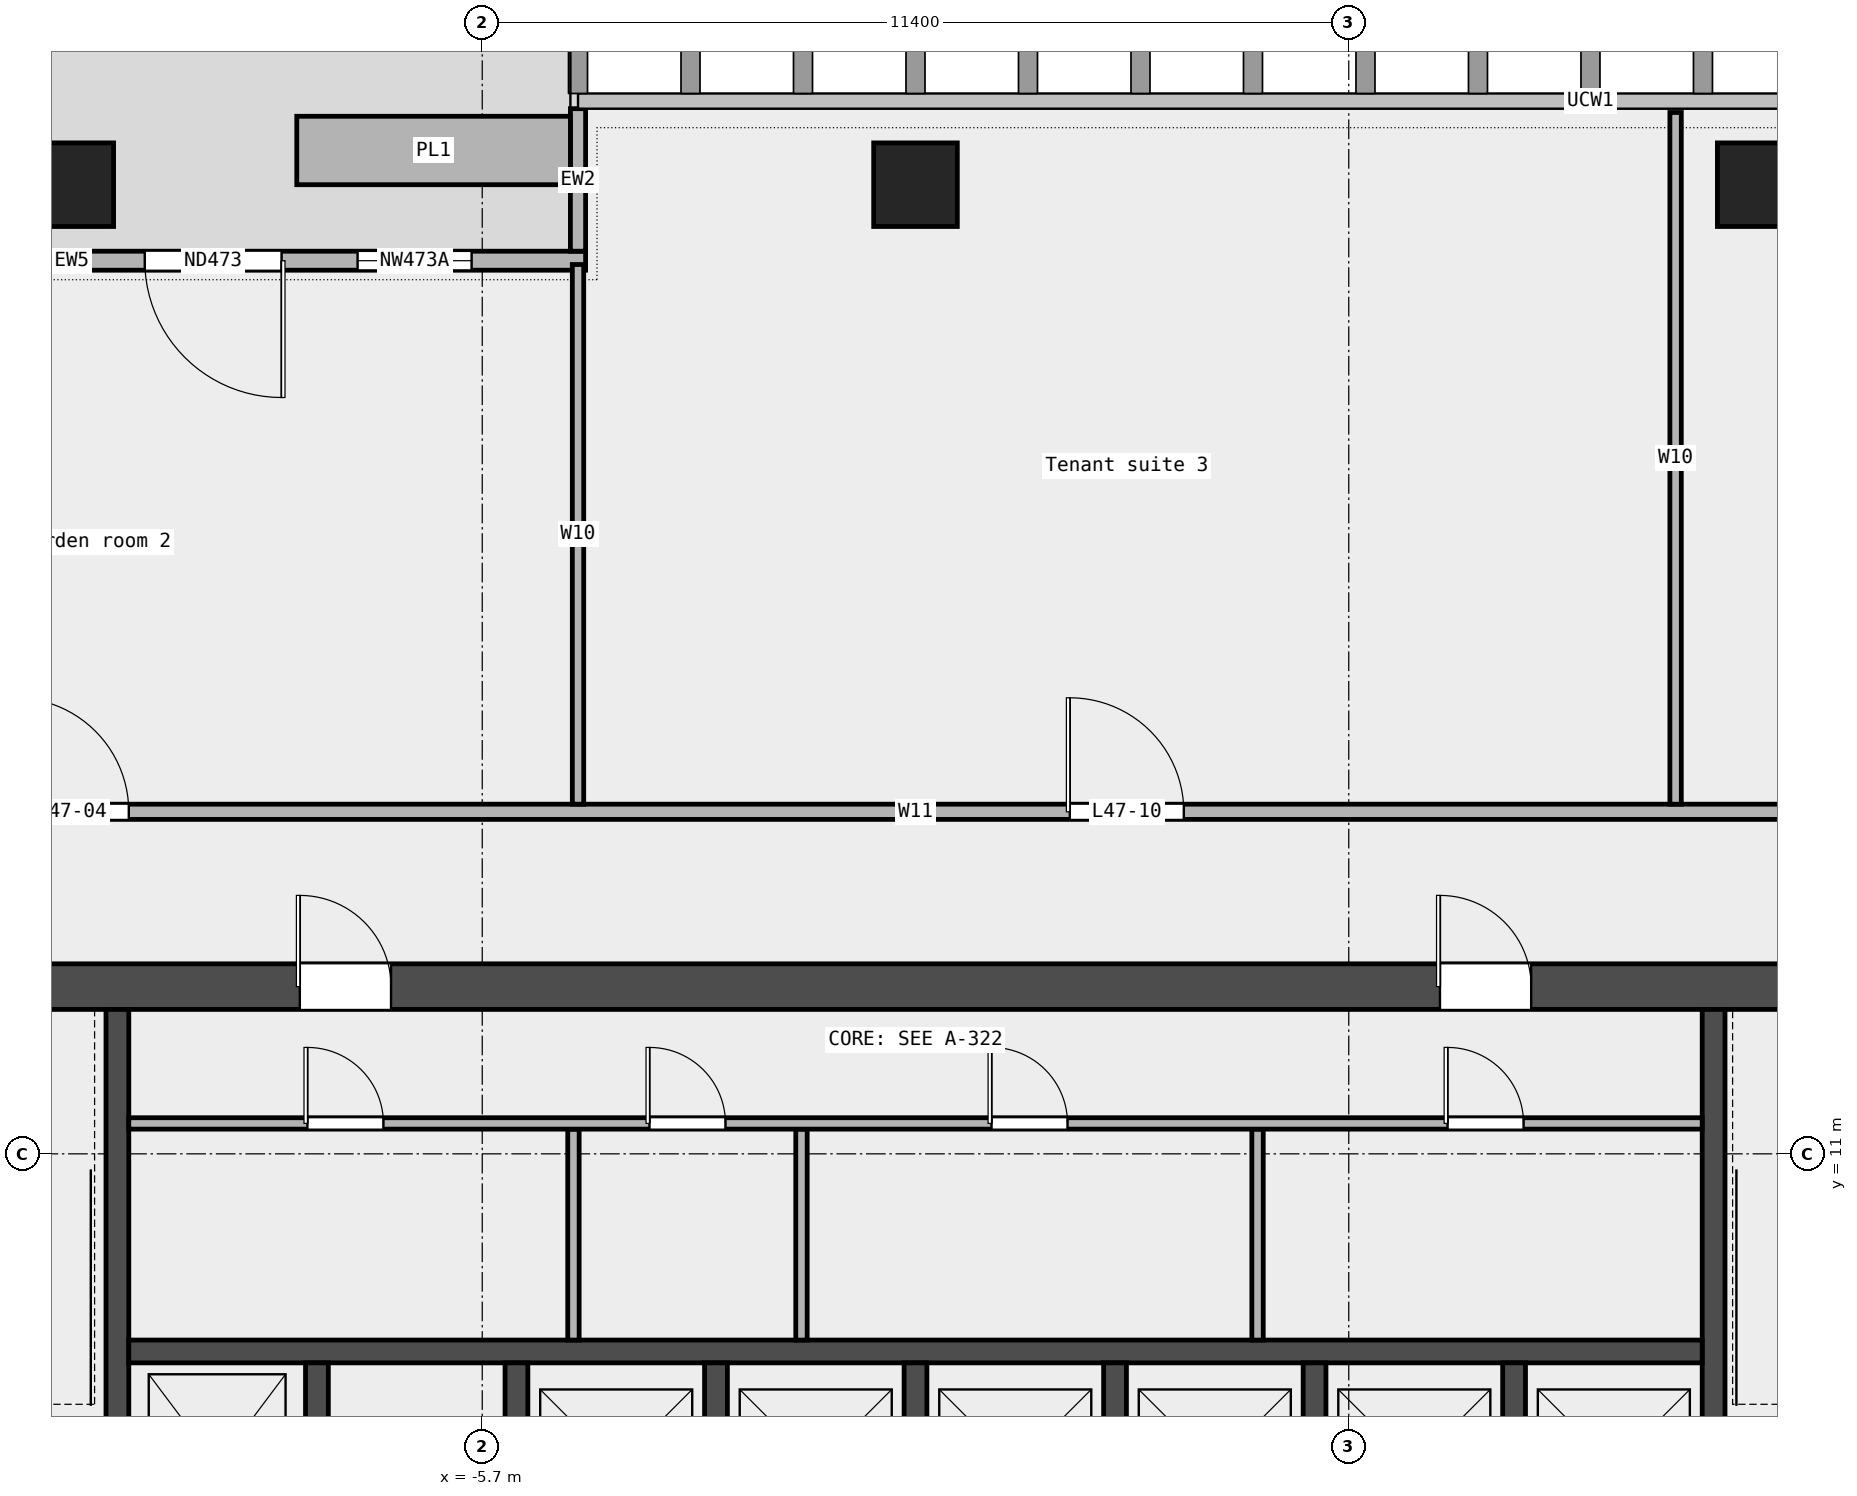
"""IFC4 building model, lengths in metres.
Left out: names, types, materials, properties, quantities, classifications, styles, units other than length and angle.
Written with IfcOpenShell. Run it as: python <this file> out.ifc"""

import sys

from ifc_helpers import new_model, si_unit, direction, frame, frame_2d, origin, origin_2d, place, context, subcontext, project, spatial, rectangle, extrude, element, fill, save


model = new_model("IFC4")
c1 = context("Model", 3, precision=1e-05, world=origin(), true_north=direction((0.0, 1.0)))
c2 = subcontext(c1, "Body", "Model", "MODEL_VIEW")
j1 = project(units=[si_unit("LENGTHUNIT", "METRE"), si_unit("PLANEANGLEUNIT", "RADIAN")], contexts=[c1])
p1 = place(None, origin())
s1 = spatial("IfcSite", under=j1, at=p1, CompositionType="ELEMENT")
p2 = place(p1, origin())
s2 = spatial("IfcBuilding", under=s1, at=p2, CompositionType="ELEMENT")
p3 = place(p2, frame((0.0, 0.0, 223.0)))
s3 = spatial("IfcBuildingStorey", under=s2, at=p3, CompositionType="ELEMENT", Elevation=223.0)
for number, where, z_axis, x_axis in (
    (1, (11.1, 23.75, 0.0), (0.0, 0.0, 1.0), (1.0, 0.0, 0.0)),
    (2, (0.0, 23.75, 0.0), (0.0, 0.0, 1.0), (1.0, 0.0, 0.0)),
    (3, (-11.1, 23.75, 0.0), (0.0, 0.0, 1.0), (1.0, 0.0, 0.0)),
):
    element("IfcColumn", number, at=place(p3, frame(where, z_axis=z_axis, x_axis=x_axis)), inside=s3, PredefinedType="COLUMN", context=c2, shape_type="SweptSolid", body=[
        extrude(rectangle(XDim=1.1, YDim=1.1, at=origin_2d()), origin(), (0.0, 0.0, 1.0), 3.6),
    ])
p4 = place(p3, frame((-4.34, 22.75, 0.0), z_axis=(0.0, 0.0, 1.0), x_axis=(-1.0, 0.0, 0.0)))
e4 = element("IfcWall", 4, at=p4, inside=s3, PredefinedType="STANDARD", context=c2, shape_type="SweptSolid", body=[
    extrude(rectangle(XDim=13.52, YDim=0.25, at=frame_2d((6.76, 0.0))), origin(), (0.0, 0.0, 1.0), 3.6),
])
p5 = place(p4, frame((1.5, 0.0, 0.45)))
e5 = element("IfcOpeningElement", 5, at=p5, cuts=e4, PredefinedType="OPENING", context=c2, shape_type="SweptSolid", body=[
    extrude(rectangle(XDim=1.5, YDim=2.4, at=frame_2d((0.75, 1.2))), frame((0.0, 0.137, 0.0), z_axis=(0.0, -1.0, 0.0), x_axis=(1.0, 0.0, 0.0)), (0.0, 0.0, 1.0), 0.274),
])
p6 = place(p4, frame((4.0, 0.0, 0.0)))
e6 = element("IfcOpeningElement", 6, at=p6, cuts=e4, PredefinedType="OPENING", context=c2, shape_type="SweptSolid", body=[
    extrude(rectangle(XDim=1.8, YDim=2.4, at=frame_2d((0.9, 1.2))), frame((0.0, 0.137, 0.0), z_axis=(0.0, -1.0, 0.0), x_axis=(1.0, 0.0, 0.0)), (0.0, 0.0, 1.0), 0.274),
])
p7 = place(p4, frame((10.5, 0.0, 0.45)))
e7 = element("IfcOpeningElement", 7, at=p7, cuts=e4, PredefinedType="OPENING", context=c2, shape_type="SweptSolid", body=[
    extrude(rectangle(XDim=1.5, YDim=2.4, at=frame_2d((0.75, 1.2))), frame((0.0, 0.137, 0.0), z_axis=(0.0, -1.0, 0.0), x_axis=(1.0, 0.0, 0.0)), (0.0, 0.0, 1.0), 0.274),
])
p8 = place(p3, frame((-4.44, 24.75, 0.0), z_axis=(0.0, 0.0, 1.0), x_axis=(0.0, -1.0, 0.0)))
e8 = element("IfcWall", 8, at=p8, inside=s3, PredefinedType="STANDARD", context=c2, shape_type="SweptSolid", body=[
    extrude(rectangle(XDim=1.875, YDim=0.2, at=frame_2d((0.938, 0.0))), origin(), (0.0, 0.0, 1.0), 3.6),
])
p9 = place(p3, frame((-4.54, 24.2, 0.0), z_axis=(0.0, 0.0, 1.0), x_axis=(-1.0, 0.0, 0.0)))
e9 = element("IfcWall", 9, at=p9, inside=s3, PredefinedType="STANDARD", context=c2, shape_type="SweptSolid", body=[
    extrude(rectangle(XDim=3.6, YDim=0.9, at=frame_2d((1.8, 0.0))), origin(), (0.0, 0.0, 1.0), 0.7),
])
p10 = place(p3, frame((-28.15, 15.5, 0.0), z_axis=(0.0, 0.0, 1.0), x_axis=(1.0, 0.0, 0.0)))
e10 = element("IfcWall", 10, at=p10, inside=s3, PredefinedType="PARTITIONING", context=c2, shape_type="SweptSolid", body=[
    extrude(rectangle(XDim=56.3, YDim=0.2, at=frame_2d((28.15, 0.0))), origin(), (0.0, 0.0, 1.0), 3.6),
])
p11 = place(p10, frame((16.3, 0.0, 0.0)))
e11 = element("IfcOpeningElement", 11, at=p11, cuts=e10, PredefinedType="OPENING", context=c2, shape_type="SweptSolid", body=[
    extrude(rectangle(XDim=1.5, YDim=2.1, at=frame_2d((0.75, 1.05))), frame((0.0, 0.112, 0.0), z_axis=(0.0, -1.0, 0.0), x_axis=(1.0, 0.0, 0.0)), (0.0, 0.0, 1.0), 0.224),
])
p12 = place(p10, frame((46.225, 0.0, 0.0)))
e12 = element("IfcOpeningElement", 12, at=p12, cuts=e10, PredefinedType="OPENING", context=c2, shape_type="SweptSolid", body=[
    extrude(rectangle(XDim=1.8, YDim=2.1, at=frame_2d((0.9, 1.05))), frame((0.0, 0.112, 0.0), z_axis=(0.0, -1.0, 0.0), x_axis=(1.0, 0.0, 0.0)), (0.0, 0.0, 1.0), 0.224),
])
p13 = place(p10, frame((30.18, 0.0, 0.0)))
e13 = element("IfcOpeningElement", 13, at=p13, cuts=e10, PredefinedType="OPENING", context=c2, shape_type="SweptSolid", body=[
    extrude(rectangle(XDim=1.5, YDim=2.1, at=frame_2d((0.75, 1.05))), frame((0.0, 0.112, 0.0), z_axis=(0.0, -1.0, 0.0), x_axis=(1.0, 0.0, 0.0)), (0.0, 0.0, 1.0), 0.224),
])
p14 = place(p10, frame((4.695, 0.0, 0.0)))
e14 = element("IfcOpeningElement", 14, at=p14, cuts=e10, PredefinedType="OPENING", context=c2, shape_type="SweptSolid", body=[
    extrude(rectangle(XDim=1.2, YDim=2.1, at=frame_2d((0.6, 1.05))), frame((0.0, 0.112, 0.0), z_axis=(0.0, -1.0, 0.0), x_axis=(1.0, 0.0, 0.0)), (0.0, 0.0, 1.0), 0.224),
])
p15 = place(p3, frame((-4.44, 15.6, 0.0), z_axis=(0.0, 0.0, 1.0), x_axis=(0.0, 1.0, 0.0)))
e15 = element("IfcWall", 15, at=p15, inside=s3, PredefinedType="PARTITIONING", context=c2, shape_type="SweptSolid", body=[
    extrude(rectangle(XDim=7.1, YDim=0.15, at=frame_2d((3.55, 0.0))), origin(), (0.0, 0.0, 1.0), 3.6),
])
p16 = place(p3, frame((10.0, 15.6, 0.0), z_axis=(0.0, 0.0, 1.0), x_axis=(0.0, 1.0, 0.0)))
e16 = element("IfcWall", 16, at=p16, inside=s3, PredefinedType="PARTITIONING", context=c2, shape_type="SweptSolid", body=[
    extrude(rectangle(XDim=9.1, YDim=0.15, at=frame_2d((4.55, 0.0))), origin(), (0.0, 0.0, 1.0), 3.6),
])
p17 = place(p3, frame((-14.4, 13.2, 0.0), z_axis=(0.0, 0.0, 1.0), x_axis=(1.0, 0.0, 0.0)))
e17 = element("IfcWall", 17, at=p17, inside=s3, PredefinedType="SHEAR", context=c2, shape_type="SweptSolid", body=[
    extrude(rectangle(XDim=28.8, YDim=0.6, at=frame_2d((14.4, 0.0))), origin(), (0.0, 0.0, 1.0), 3.7),
])
p18 = place(p17, frame((6.3, 0.0, 0.0)))
e18 = element("IfcOpeningElement", 18, at=p18, cuts=e17, PredefinedType="OPENING", context=c2, shape_type="SweptSolid", body=[
    extrude(rectangle(XDim=1.2, YDim=2.1, at=frame_2d((0.6, 1.05))), frame((0.0, 0.312, 0.0), z_axis=(0.0, -1.0, 0.0), x_axis=(1.0, 0.0, 0.0)), (0.0, 0.0, 1.0), 0.624),
])
p19 = place(p17, frame((21.3, 0.0, 0.0)))
e19 = element("IfcOpeningElement", 19, at=p19, cuts=e17, PredefinedType="OPENING", context=c2, shape_type="SweptSolid", body=[
    extrude(rectangle(XDim=1.2, YDim=2.1, at=frame_2d((0.6, 1.05))), frame((0.0, 0.312, 0.0), z_axis=(0.0, -1.0, 0.0), x_axis=(1.0, 0.0, 0.0)), (0.0, 0.0, 1.0), 0.624),
])
for number, where, z_axis, x_axis in (
    (20, (-10.5, 5.25, 0.0), (0.0, 0.0, 1.0), (0.0, 1.0, 0.0)),
    (21, (10.5, 5.25, 0.0), (0.0, 0.0, 1.0), (0.0, 1.0, 0.0)),
):
    element("IfcWall", number, at=place(p3, frame(where, z_axis=z_axis, x_axis=x_axis)), inside=s3, PredefinedType="SHEAR", context=c2, shape_type="SweptSolid", body=[
        extrude(rectangle(XDim=7.65, YDim=0.3, at=frame_2d((3.825, 0.0))), origin(), (0.0, 0.0, 1.0), 3.7),
    ])
p20 = place(p3, frame((-10.35, 8.4, 0.0), z_axis=(0.0, 0.0, 1.0), x_axis=(1.0, 0.0, 0.0)))
e22 = element("IfcWall", 22, at=p20, inside=s3, PredefinedType="SOLIDWALL", context=c2, shape_type="SweptSolid", body=[
    extrude(rectangle(XDim=20.7, YDim=0.3, at=frame_2d((10.35, 0.0))), origin(), (0.0, 0.0, 1.0), 3.7),
])
for number, where, z_axis, x_axis in (
    (23, (-7.875, 5.55, 0.0), (0.0, 0.0, 1.0), (0.0, 1.0, 0.0)),
    (24, (-5.25, 5.55, 0.0), (0.0, 0.0, 1.0), (0.0, 1.0, 0.0)),
    (25, (-2.625, 5.55, 0.0), (0.0, 0.0, 1.0), (0.0, 1.0, 0.0)),
    (26, (0.0, 5.55, 0.0), (0.0, 0.0, 1.0), (0.0, 1.0, 0.0)),
    (27, (2.625, 5.55, 0.0), (0.0, 0.0, 1.0), (0.0, 1.0, 0.0)),
    (28, (5.25, 5.55, 0.0), (0.0, 0.0, 1.0), (0.0, 1.0, 0.0)),
    (29, (7.875, 5.55, 0.0), (0.0, 0.0, 1.0), (0.0, 1.0, 0.0)),
):
    element("IfcWall", number, at=place(p3, frame(where, z_axis=z_axis, x_axis=x_axis)), inside=s3, PredefinedType="SOLIDWALL", context=c2, shape_type="SweptSolid", body=[
        extrude(rectangle(XDim=2.7, YDim=0.3, at=frame_2d((1.35, 0.0))), origin(), (0.0, 0.0, 1.0), 3.7),
    ])
for number, where, z_axis, x_axis in (
    (30, (-4.5, 8.55, 0.0), (0.0, 0.0, 1.0), (0.0, 1.0, 0.0)),
    (31, (-1.5, 8.55, 0.0), (0.0, 0.0, 1.0), (0.0, 1.0, 0.0)),
    (32, (4.5, 8.55, 0.0), (0.0, 0.0, 1.0), (0.0, 1.0, 0.0)),
):
    element("IfcWall", number, at=place(p3, frame(where, z_axis=z_axis, x_axis=x_axis)), inside=s3, PredefinedType="PARTITIONING", context=c2, shape_type="SweptSolid", body=[
        extrude(rectangle(XDim=2.775, YDim=0.15, at=frame_2d((1.387, 0.0))), origin(), (0.0, 0.0, 1.0), 3.7),
    ])
p21 = place(p3, frame((-10.35, 11.4, 0.0), z_axis=(0.0, 0.0, 1.0), x_axis=(1.0, 0.0, 0.0)))
e33 = element("IfcWall", 33, at=p21, inside=s3, PredefinedType="PARTITIONING", context=c2, shape_type="SweptSolid", body=[
    extrude(rectangle(XDim=20.7, YDim=0.15, at=frame_2d((10.35, 0.0))), origin(), (0.0, 0.0, 1.0), 3.7),
])
p22 = place(p21, frame((2.35, 0.0, 0.0)))
e34 = element("IfcOpeningElement", 34, at=p22, cuts=e33, PredefinedType="OPENING", context=c2, shape_type="SweptSolid", body=[
    extrude(rectangle(XDim=1.0, YDim=2.1, at=frame_2d((0.5, 1.05))), frame((0.0, 0.087, 0.0), z_axis=(0.0, -1.0, 0.0), x_axis=(1.0, 0.0, 0.0)), (0.0, 0.0, 1.0), 0.174),
])
p23 = place(p21, frame((6.85, 0.0, 0.0)))
e35 = element("IfcOpeningElement", 35, at=p23, cuts=e33, PredefinedType="OPENING", context=c2, shape_type="SweptSolid", body=[
    extrude(rectangle(XDim=1.0, YDim=2.1, at=frame_2d((0.5, 1.05))), frame((0.0, 0.087, 0.0), z_axis=(0.0, -1.0, 0.0), x_axis=(1.0, 0.0, 0.0)), (0.0, 0.0, 1.0), 0.174),
])
p24 = place(p21, frame((11.35, 0.0, 0.0)))
e36 = element("IfcOpeningElement", 36, at=p24, cuts=e33, PredefinedType="OPENING", context=c2, shape_type="SweptSolid", body=[
    extrude(rectangle(XDim=1.0, YDim=2.1, at=frame_2d((0.5, 1.05))), frame((0.0, 0.087, 0.0), z_axis=(0.0, -1.0, 0.0), x_axis=(1.0, 0.0, 0.0)), (0.0, 0.0, 1.0), 0.174),
])
p25 = place(p21, frame((17.35, 0.0, 0.0)))
e37 = element("IfcOpeningElement", 37, at=p25, cuts=e33, PredefinedType="OPENING", context=c2, shape_type="SweptSolid", body=[
    extrude(rectangle(XDim=1.0, YDim=2.1, at=frame_2d((0.5, 1.05))), frame((0.0, 0.087, 0.0), z_axis=(0.0, -1.0, 0.0), x_axis=(1.0, 0.0, 0.0)), (0.0, 0.0, 1.0), 0.174),
])
p26 = place(p5, origin())
e38 = element("IfcWindow", 38, at=p26, inside=s3, PartitioningType="SINGLE_PANEL", PredefinedType="WINDOW", context=c2, shape_type="SweptSolid", body=[
    extrude(rectangle(XDim=1.5, YDim=2.4, at=frame_2d((0.75, 1.2))), frame((0.0, 0.03, 0.0), z_axis=(0.0, -1.0, 0.0), x_axis=(1.0, 0.0, 0.0)), (0.0, 0.0, 1.0), 0.06),
])
fill(e5, e38)
p27 = place(p6, origin())
e39 = element("IfcDoor", 39, at=p27, inside=s3, OperationType="DOUBLE_DOOR_SINGLE_SWING", PredefinedType="DOOR", context=c2, shape_type="SweptSolid", body=[
    extrude(rectangle(XDim=1.8, YDim=2.4, at=frame_2d((0.9, 1.2))), frame((0.0, 0.025, 0.0), z_axis=(0.0, -1.0, 0.0), x_axis=(1.0, 0.0, 0.0)), (0.0, 0.0, 1.0), 0.05),
])
fill(e6, e39)
p28 = place(p11, origin())
e40 = element("IfcDoor", 40, at=p28, inside=s3, OperationType="DOUBLE_DOOR_SINGLE_SWING", PredefinedType="DOOR", context=c2, shape_type="SweptSolid", body=[
    extrude(rectangle(XDim=1.5, YDim=2.1, at=frame_2d((0.75, 1.05))), frame((0.0, 0.025, 0.0), z_axis=(0.0, -1.0, 0.0), x_axis=(1.0, 0.0, 0.0)), (0.0, 0.0, 1.0), 0.05),
])
fill(e11, e40)
p29 = place(p13, origin())
e41 = element("IfcDoor", 41, at=p29, inside=s3, OperationType="DOUBLE_DOOR_SINGLE_SWING", PredefinedType="DOOR", context=c2, shape_type="SweptSolid", body=[
    extrude(rectangle(XDim=1.5, YDim=2.1, at=frame_2d((0.75, 1.05))), frame((0.0, 0.025, 0.0), z_axis=(0.0, -1.0, 0.0), x_axis=(1.0, 0.0, 0.0)), (0.0, 0.0, 1.0), 0.05),
])
fill(e13, e41)
p30 = place(p22, origin())
e42 = element("IfcDoor", 42, at=p30, inside=s3, OperationType="SINGLE_SWING_LEFT", PredefinedType="DOOR", context=c2, shape_type="SweptSolid", body=[
    extrude(rectangle(XDim=1.0, YDim=2.1, at=frame_2d((0.5, 1.05))), frame((0.0, 0.025, 0.0), z_axis=(0.0, -1.0, 0.0), x_axis=(1.0, 0.0, 0.0)), (0.0, 0.0, 1.0), 0.05),
])
fill(e34, e42)
p31 = place(p23, origin())
e43 = element("IfcDoor", 43, at=p31, inside=s3, OperationType="SINGLE_SWING_LEFT", PredefinedType="DOOR", context=c2, shape_type="SweptSolid", body=[
    extrude(rectangle(XDim=1.0, YDim=2.1, at=frame_2d((0.5, 1.05))), frame((0.0, 0.025, 0.0), z_axis=(0.0, -1.0, 0.0), x_axis=(1.0, 0.0, 0.0)), (0.0, 0.0, 1.0), 0.05),
])
fill(e35, e43)
p32 = place(p24, origin())
e44 = element("IfcDoor", 44, at=p32, inside=s3, OperationType="SINGLE_SWING_LEFT", PredefinedType="DOOR", context=c2, shape_type="SweptSolid", body=[
    extrude(rectangle(XDim=1.0, YDim=2.1, at=frame_2d((0.5, 1.05))), frame((0.0, 0.025, 0.0), z_axis=(0.0, -1.0, 0.0), x_axis=(1.0, 0.0, 0.0)), (0.0, 0.0, 1.0), 0.05),
])
fill(e36, e44)
p33 = place(p25, origin())
e45 = element("IfcDoor", 45, at=p33, inside=s3, OperationType="SINGLE_SWING_LEFT", PredefinedType="DOOR", context=c2, shape_type="SweptSolid", body=[
    extrude(rectangle(XDim=1.0, YDim=2.1, at=frame_2d((0.5, 1.05))), frame((0.0, 0.025, 0.0), z_axis=(0.0, -1.0, 0.0), x_axis=(1.0, 0.0, 0.0)), (0.0, 0.0, 1.0), 0.05),
])
fill(e37, e45)
p34 = place(p18, origin())
e46 = element("IfcDoor", 46, at=p34, inside=s3, OperationType="SINGLE_SWING_LEFT", PredefinedType="DOOR", context=c2, shape_type="SweptSolid", body=[
    extrude(rectangle(XDim=1.2, YDim=2.1, at=frame_2d((0.6, 1.05))), frame((0.0, 0.025, 0.0), z_axis=(0.0, -1.0, 0.0), x_axis=(1.0, 0.0, 0.0)), (0.0, 0.0, 1.0), 0.05),
])
fill(e18, e46)
p35 = place(p19, origin())
e47 = element("IfcDoor", 47, at=p35, inside=s3, OperationType="SINGLE_SWING_RIGHT", PredefinedType="DOOR", context=c2, shape_type="SweptSolid", body=[
    extrude(rectangle(XDim=1.2, YDim=2.1, at=frame_2d((0.6, 1.05))), frame((0.0, 0.025, 0.0), z_axis=(0.0, -1.0, 0.0), x_axis=(1.0, 0.0, 0.0)), (0.0, 0.0, 1.0), 0.05),
])
fill(e19, e47)
save(model, sys.argv[1])
